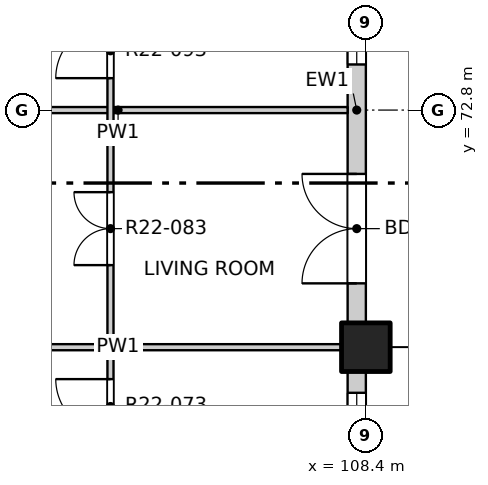
"""IFC4 building model, lengths in metres.
Left out: names, types, materials, properties, quantities, classifications, styles, units other than length and angle.
Written with IfcOpenShell. Run it as: python <this file> out.ifc"""

import sys

from ifc_helpers import new_model, si_unit, direction, frame, frame_2d, origin, origin_2d, place, context, subcontext, project, spatial, rectangle, extrude, element, fill, save


model = new_model("IFC4")
c1 = context("Model", 3, precision=1e-05, world=origin(), true_north=direction((0.0, 1.0)))
c2 = subcontext(c1, "Body", "Model", "MODEL_VIEW")
j1 = project(units=[si_unit("LENGTHUNIT", "METRE"), si_unit("PLANEANGLEUNIT", "RADIAN")], contexts=[c1])
p1 = place(None, origin())
s1 = spatial("IfcSite", under=j1, at=p1, CompositionType="ELEMENT")
p2 = place(p1, origin())
s2 = spatial("IfcBuilding", under=s1, at=p2, CompositionType="ELEMENT")
p3 = place(p2, frame((0.0, 0.0, 231.3)))
s3 = spatial("IfcBuildingStorey", under=s2, at=p3, CompositionType="ELEMENT", Elevation=231.3)
p4 = place(p3, frame((108.4, 68.9, -0.25), z_axis=(0.0, 0.0, 1.0), x_axis=(1.0, 0.0, 0.0)))
e1 = element("IfcColumn", 1, at=p4, inside=s3, PredefinedType="COLUMN", context=c2, shape_type="SweptSolid", body=[
    extrude(rectangle(XDim=0.8, YDim=0.8, at=origin_2d()), origin(), (0.0, 0.0, 1.0), 3.4),
])
p5 = place(p3, frame((108.25, 61.5, 0.0), z_axis=(0.0, 0.0, 1.0), x_axis=(0.0, 1.0, 0.0)))
e2 = element("IfcWall", 2, at=p5, inside=s3, PredefinedType="SOLIDWALL", context=c2, shape_type="SweptSolid", body=[
    extrude(rectangle(XDim=7.0, YDim=0.3, at=frame_2d((3.5, 0.0))), origin(), (0.0, 0.0, 1.0), 2.7),
])
p6 = place(p5, frame((0.65, 0.0, 0.0)))
e3 = element("IfcOpeningElement", 3, at=p6, cuts=e2, PredefinedType="OPENING", context=c2, shape_type="SweptSolid", body=[
    extrude(rectangle(XDim=1.8, YDim=2.4, at=frame_2d((0.9, 1.2))), frame((0.0, 0.16, 0.0), z_axis=(0.0, -1.0, 0.0), x_axis=(1.0, 0.0, 0.0)), (0.0, 0.0, 1.0), 0.32),
])
p7 = place(p5, frame((4.25, 0.0, 0.9)))
e4 = element("IfcOpeningElement", 4, at=p7, cuts=e2, PredefinedType="OPENING", context=c2, shape_type="SweptSolid", body=[
    extrude(rectangle(XDim=2.4, YDim=1.8, at=frame_2d((1.2, 0.9))), frame((0.0, 0.16, 0.0), z_axis=(0.0, -1.0, 0.0), x_axis=(1.0, 0.0, 0.0)), (0.0, 0.0, 1.0), 0.32),
])
p8 = place(p3, frame((108.25, 69.3, 0.0), z_axis=(0.0, 0.0, 1.0), x_axis=(0.0, 1.0, 0.0)))
e5 = element("IfcWall", 5, at=p8, inside=s3, PredefinedType="SOLIDWALL", context=c2, shape_type="SweptSolid", body=[
    extrude(rectangle(XDim=7.0, YDim=0.3, at=frame_2d((3.5, 0.0))), origin(), (0.0, 0.0, 1.0), 2.7),
])
p9 = place(p8, frame((0.65, 0.0, 0.0)))
e6 = element("IfcOpeningElement", 6, at=p9, cuts=e5, PredefinedType="OPENING", context=c2, shape_type="SweptSolid", body=[
    extrude(rectangle(XDim=1.8, YDim=2.4, at=frame_2d((0.9, 1.2))), frame((0.0, 0.16, 0.0), z_axis=(0.0, -1.0, 0.0), x_axis=(1.0, 0.0, 0.0)), (0.0, 0.0, 1.0), 0.32),
])
p10 = place(p8, frame((4.25, 0.0, 0.9)))
e7 = element("IfcOpeningElement", 7, at=p10, cuts=e5, PredefinedType="OPENING", context=c2, shape_type="SweptSolid", body=[
    extrude(rectangle(XDim=2.4, YDim=1.8, at=frame_2d((1.2, 0.9))), frame((0.0, 0.16, 0.0), z_axis=(0.0, -1.0, 0.0), x_axis=(1.0, 0.0, 0.0)), (0.0, 0.0, 1.0), 0.32),
])
p11 = place(p3, frame((100.55, 68.9, 0.0), z_axis=(0.0, 0.0, 1.0), x_axis=(1.0, 0.0, 0.0)))
e8 = element("IfcWall", 8, at=p11, inside=s3, PredefinedType="PARTITIONING", context=c2, shape_type="SweptSolid", body=[
    extrude(rectangle(XDim=7.55, YDim=0.1, at=frame_2d((3.775, 0.0))), origin(), (0.0, 0.0, 1.0), 2.55),
])
p12 = place(p3, frame((100.55, 72.8, 0.0), z_axis=(0.0, 0.0, 1.0), x_axis=(1.0, 0.0, 0.0)))
e9 = element("IfcWall", 9, at=p12, inside=s3, PredefinedType="PARTITIONING", context=c2, shape_type="SweptSolid", body=[
    extrude(rectangle(XDim=7.55, YDim=0.1, at=frame_2d((3.775, 0.0))), origin(), (0.0, 0.0, 1.0), 3.15),
])
p13 = place(p3, frame((104.2, 41.9, 0.0), z_axis=(0.0, 0.0, 1.0), x_axis=(0.0, 1.0, 0.0)))
e10 = element("IfcWall", 10, at=p13, inside=s3, PredefinedType="PARTITIONING", context=c2, shape_type="SweptSolid", body=[
    extrude(rectangle(XDim=34.7, YDim=0.1, at=frame_2d((17.35, 0.0))), origin(), (0.0, 0.0, 1.0), 3.15),
])
p14 = place(p13, frame((1.05, 0.0, 0.0)))
e11 = element("IfcOpeningElement", 11, at=p14, cuts=e10, PredefinedType="OPENING", context=c2, shape_type="SweptSolid", body=[
    extrude(rectangle(XDim=1.2, YDim=2.1, at=frame_2d((0.6, 1.05))), frame((0.0, 0.06, 0.0), z_axis=(0.0, -1.0, 0.0), x_axis=(1.0, 0.0, 0.0)), (0.0, 0.0, 1.0), 0.12),
])
p15 = place(p13, frame((4.125, 0.0, 0.0)))
e12 = element("IfcOpeningElement", 12, at=p15, cuts=e10, PredefinedType="OPENING", context=c2, shape_type="SweptSolid", body=[
    extrude(rectangle(XDim=0.9, YDim=2.1, at=frame_2d((0.45, 1.05))), frame((0.0, 0.06, 0.0), z_axis=(0.0, -1.0, 0.0), x_axis=(1.0, 0.0, 0.0)), (0.0, 0.0, 1.0), 0.12),
])
p16 = place(p13, frame((6.075, 0.0, 0.0)))
e13 = element("IfcOpeningElement", 13, at=p16, cuts=e10, PredefinedType="OPENING", context=c2, shape_type="SweptSolid", body=[
    extrude(rectangle(XDim=0.9, YDim=2.1, at=frame_2d((0.45, 1.05))), frame((0.0, 0.06, 0.0), z_axis=(0.0, -1.0, 0.0), x_axis=(1.0, 0.0, 0.0)), (0.0, 0.0, 1.0), 0.12),
])
p17 = place(p13, frame((8.85, 0.0, 0.0)))
e14 = element("IfcOpeningElement", 14, at=p17, cuts=e10, PredefinedType="OPENING", context=c2, shape_type="SweptSolid", body=[
    extrude(rectangle(XDim=1.2, YDim=2.1, at=frame_2d((0.6, 1.05))), frame((0.0, 0.06, 0.0), z_axis=(0.0, -1.0, 0.0), x_axis=(1.0, 0.0, 0.0)), (0.0, 0.0, 1.0), 0.12),
])
p18 = place(p13, frame((12.75, 0.0, 0.0)))
e15 = element("IfcOpeningElement", 15, at=p18, cuts=e10, PredefinedType="OPENING", context=c2, shape_type="SweptSolid", body=[
    extrude(rectangle(XDim=1.2, YDim=2.1, at=frame_2d((0.6, 1.05))), frame((0.0, 0.06, 0.0), z_axis=(0.0, -1.0, 0.0), x_axis=(1.0, 0.0, 0.0)), (0.0, 0.0, 1.0), 0.12),
])
p19 = place(p13, frame((15.825, 0.0, 0.0)))
e16 = element("IfcOpeningElement", 16, at=p19, cuts=e10, PredefinedType="OPENING", context=c2, shape_type="SweptSolid", body=[
    extrude(rectangle(XDim=0.9, YDim=2.1, at=frame_2d((0.45, 1.05))), frame((0.0, 0.06, 0.0), z_axis=(0.0, -1.0, 0.0), x_axis=(1.0, 0.0, 0.0)), (0.0, 0.0, 1.0), 0.12),
])
p20 = place(p13, frame((17.775, 0.0, 0.0)))
e17 = element("IfcOpeningElement", 17, at=p20, cuts=e10, PredefinedType="OPENING", context=c2, shape_type="SweptSolid", body=[
    extrude(rectangle(XDim=0.9, YDim=2.1, at=frame_2d((0.45, 1.05))), frame((0.0, 0.06, 0.0), z_axis=(0.0, -1.0, 0.0), x_axis=(1.0, 0.0, 0.0)), (0.0, 0.0, 1.0), 0.12),
])
p21 = place(p13, frame((19.725, 0.0, 0.0)))
e18 = element("IfcOpeningElement", 18, at=p21, cuts=e10, PredefinedType="OPENING", context=c2, shape_type="SweptSolid", body=[
    extrude(rectangle(XDim=0.9, YDim=2.1, at=frame_2d((0.45, 1.05))), frame((0.0, 0.06, 0.0), z_axis=(0.0, -1.0, 0.0), x_axis=(1.0, 0.0, 0.0)), (0.0, 0.0, 1.0), 0.12),
])
p22 = place(p13, frame((21.675, 0.0, 0.0)))
e19 = element("IfcOpeningElement", 19, at=p22, cuts=e10, PredefinedType="OPENING", context=c2, shape_type="SweptSolid", body=[
    extrude(rectangle(XDim=0.9, YDim=2.1, at=frame_2d((0.45, 1.05))), frame((0.0, 0.06, 0.0), z_axis=(0.0, -1.0, 0.0), x_axis=(1.0, 0.0, 0.0)), (0.0, 0.0, 1.0), 0.12),
])
p23 = place(p13, frame((23.625, 0.0, 0.0)))
e20 = element("IfcOpeningElement", 20, at=p23, cuts=e10, PredefinedType="OPENING", context=c2, shape_type="SweptSolid", body=[
    extrude(rectangle(XDim=0.9, YDim=2.1, at=frame_2d((0.45, 1.05))), frame((0.0, 0.06, 0.0), z_axis=(0.0, -1.0, 0.0), x_axis=(1.0, 0.0, 0.0)), (0.0, 0.0, 1.0), 0.12),
])
p24 = place(p13, frame((25.575, 0.0, 0.0)))
e21 = element("IfcOpeningElement", 21, at=p24, cuts=e10, PredefinedType="OPENING", context=c2, shape_type="SweptSolid", body=[
    extrude(rectangle(XDim=0.9, YDim=2.1, at=frame_2d((0.45, 1.05))), frame((0.0, 0.06, 0.0), z_axis=(0.0, -1.0, 0.0), x_axis=(1.0, 0.0, 0.0)), (0.0, 0.0, 1.0), 0.12),
])
p25 = place(p13, frame((28.35, 0.0, 0.0)))
e22 = element("IfcOpeningElement", 22, at=p25, cuts=e10, PredefinedType="OPENING", context=c2, shape_type="SweptSolid", body=[
    extrude(rectangle(XDim=1.2, YDim=2.1, at=frame_2d((0.6, 1.05))), frame((0.0, 0.06, 0.0), z_axis=(0.0, -1.0, 0.0), x_axis=(1.0, 0.0, 0.0)), (0.0, 0.0, 1.0), 0.12),
])
p26 = place(p13, frame((31.425, 0.0, 0.0)))
e23 = element("IfcOpeningElement", 23, at=p26, cuts=e10, PredefinedType="OPENING", context=c2, shape_type="SweptSolid", body=[
    extrude(rectangle(XDim=0.9, YDim=2.1, at=frame_2d((0.45, 1.05))), frame((0.0, 0.06, 0.0), z_axis=(0.0, -1.0, 0.0), x_axis=(1.0, 0.0, 0.0)), (0.0, 0.0, 1.0), 0.12),
])
p27 = place(p13, frame((33.375, 0.0, 0.0)))
e24 = element("IfcOpeningElement", 24, at=p27, cuts=e10, PredefinedType="OPENING", context=c2, shape_type="SweptSolid", body=[
    extrude(rectangle(XDim=0.9, YDim=2.1, at=frame_2d((0.45, 1.05))), frame((0.0, 0.06, 0.0), z_axis=(0.0, -1.0, 0.0), x_axis=(1.0, 0.0, 0.0)), (0.0, 0.0, 1.0), 0.12),
])
p28 = place(p7, origin())
e25 = element("IfcWindow", 25, at=p28, inside=s3, PartitioningType="DOUBLE_PANEL_VERTICAL", PredefinedType="WINDOW", context=c2, shape_type="SweptSolid", body=[
    extrude(rectangle(XDim=2.4, YDim=1.8, at=frame_2d((1.2, 0.9))), frame((0.0, 0.03, 0.0), z_axis=(0.0, -1.0, 0.0), x_axis=(1.0, 0.0, 0.0)), (0.0, 0.0, 1.0), 0.06),
])
fill(e4, e25)
p29 = place(p9, origin())
e26 = element("IfcDoor", 26, at=p29, inside=s3, OperationType="DOUBLE_DOOR_SINGLE_SWING", PredefinedType="DOOR", context=c2, shape_type="SweptSolid", body=[
    extrude(rectangle(XDim=1.8, YDim=2.4, at=frame_2d((0.9, 1.2))), frame((0.0, 0.025, 0.0), z_axis=(0.0, -1.0, 0.0), x_axis=(1.0, 0.0, 0.0)), (0.0, 0.0, 1.0), 0.05),
])
fill(e6, e26)
p30 = place(p10, origin())
e27 = element("IfcWindow", 27, at=p30, inside=s3, PartitioningType="DOUBLE_PANEL_VERTICAL", PredefinedType="WINDOW", context=c2, shape_type="SweptSolid", body=[
    extrude(rectangle(XDim=2.4, YDim=1.8, at=frame_2d((1.2, 0.9))), frame((0.0, 0.03, 0.0), z_axis=(0.0, -1.0, 0.0), x_axis=(1.0, 0.0, 0.0)), (0.0, 0.0, 1.0), 0.06),
])
fill(e7, e27)
p31 = place(p24, origin())
e28 = element("IfcDoor", 28, at=p31, inside=s3, OperationType="SINGLE_SWING_RIGHT", PredefinedType="DOOR", context=c2, shape_type="SweptSolid", body=[
    extrude(rectangle(XDim=0.9, YDim=2.1, at=frame_2d((0.45, 1.05))), frame((0.0, 0.025, 0.0), z_axis=(0.0, -1.0, 0.0), x_axis=(1.0, 0.0, 0.0)), (0.0, 0.0, 1.0), 0.05),
])
fill(e21, e28)
p32 = place(p25, origin())
e29 = element("IfcDoor", 29, at=p32, inside=s3, OperationType="DOUBLE_DOOR_SINGLE_SWING", PredefinedType="DOOR", context=c2, shape_type="SweptSolid", body=[
    extrude(rectangle(XDim=1.2, YDim=2.1, at=frame_2d((0.6, 1.05))), frame((0.0, 0.025, 0.0), z_axis=(0.0, -1.0, 0.0), x_axis=(1.0, 0.0, 0.0)), (0.0, 0.0, 1.0), 0.05),
])
fill(e22, e29)
p33 = place(p26, origin())
e30 = element("IfcDoor", 30, at=p33, inside=s3, OperationType="SINGLE_SWING_LEFT", PredefinedType="DOOR", context=c2, shape_type="SweptSolid", body=[
    extrude(rectangle(XDim=0.9, YDim=2.1, at=frame_2d((0.45, 1.05))), frame((0.0, 0.025, 0.0), z_axis=(0.0, -1.0, 0.0), x_axis=(1.0, 0.0, 0.0)), (0.0, 0.0, 1.0), 0.05),
])
fill(e23, e30)
save(model, sys.argv[1])
